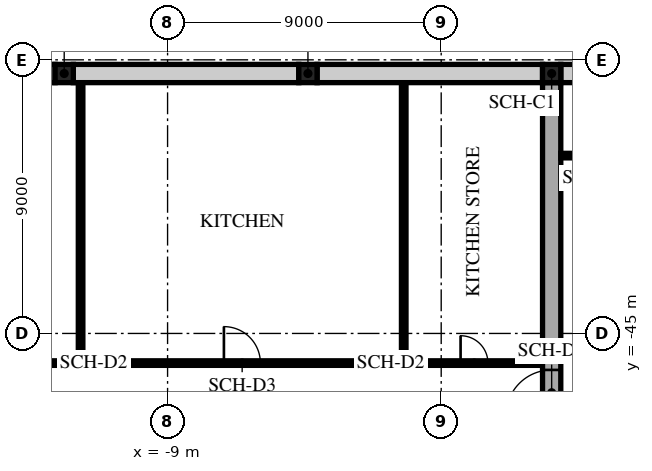
"""IFC4 building model, lengths in metres.
Left out: names, types, materials, properties, quantities, classifications, styles, units other than length and angle.
Written with IfcOpenShell. Run it as: python <this file> out.ifc"""

import sys

from ifc_helpers import new_model, si_unit, direction, frame, frame_2d, origin, origin_2d, place, context, subcontext, project, spatial, rectangle, extrude, element, fill, save


model = new_model("IFC4")
c1 = context("Model", 3, precision=1e-05, world=origin(), true_north=direction((0.0, 1.0)))
c2 = subcontext(c1, "Body", "Model", "MODEL_VIEW")
j1 = project(units=[si_unit("LENGTHUNIT", "METRE"), si_unit("PLANEANGLEUNIT", "RADIAN")], contexts=[c1])
p1 = place(None, origin())
s1 = spatial("IfcSite", under=j1, at=p1, CompositionType="ELEMENT")
p2 = place(p1, origin())
s2 = spatial("IfcBuilding", under=s1, at=p2, CompositionType="ELEMENT")
p3 = place(p2, origin())
s3 = spatial("IfcBuildingStorey", under=s2, at=p3, CompositionType="ELEMENT", Elevation=0.0)
for number, where, z_axis, x_axis in (
    (1, (-12.4, -36.45, -0.2), (0.0, 0.0, 1.0), (1.0, 0.0, 0.0)),
    (2, (-4.383, -36.45, -0.2), (0.0, 0.0, 1.0), (1.0, 0.0, 0.0)),
    (3, (3.633, -36.45, -0.2), (0.0, 0.0, 1.0), (1.0, 0.0, 0.0)),
):
    element("IfcColumn", number, at=place(p3, frame(where, z_axis=z_axis, x_axis=x_axis)), inside=s3, PredefinedType="COLUMN", context=c2, shape_type="SweptSolid", body=[
        extrude(rectangle(XDim=0.6, YDim=0.6, at=origin_2d()), origin(), (0.0, 0.0, 1.0), 4.7),
    ])
for number, where, z_axis, x_axis in (
    (4, (-11.861, -45.9, 0.0), (0.0, 0.0, 1.0), (0.0, 1.0, 0.0)),
    (5, (-1.233, -45.9, 0.0), (0.0, 0.0, 1.0), (0.0, 1.0, 0.0)),
):
    element("IfcWall", number, at=place(p3, frame(where, z_axis=z_axis, x_axis=x_axis)), inside=s3, PredefinedType="PARTITIONING", context=c2, shape_type="SweptSolid", body=[
        extrude(rectangle(XDim=9.15, YDim=0.15, at=frame_2d((4.575, 0.0))), origin(), (0.0, 0.0, 1.0), 4.1),
    ])
p4 = place(p3, frame((-16.502, -45.975, 0.0), z_axis=(0.0, 0.0, 1.0), x_axis=(1.0, 0.0, 0.0)))
e6 = element("IfcWall", 6, at=p4, inside=s3, PredefinedType="PARTITIONING", context=c2, shape_type="SweptSolid", body=[
    extrude(rectangle(XDim=4.641, YDim=0.15, at=frame_2d((2.32, 0.0))), origin(), (0.0, 0.0, 1.0), 4.1),
])
p5 = place(p4, frame((1.87, 0.0, 0.0)))
e7 = element("IfcOpeningElement", 7, at=p5, cuts=e6, PredefinedType="OPENING", context=c2, shape_type="SweptSolid", body=[
    extrude(rectangle(XDim=0.9, YDim=2.1, at=frame_2d((0.45, 1.05))), frame((0.0, 0.085, 0.0), z_axis=(0.0, -1.0, 0.0), x_axis=(1.0, 0.0, 0.0)), (0.0, 0.0, 1.0), 0.17),
])
p6 = place(p3, frame((-11.861, -45.975, 0.0), z_axis=(0.0, 0.0, 1.0), x_axis=(1.0, 0.0, 0.0)))
e8 = element("IfcWall", 8, at=p6, inside=s3, PredefinedType="PARTITIONING", context=c2, shape_type="SweptSolid", body=[
    extrude(rectangle(XDim=10.628, YDim=0.15, at=frame_2d((5.314, 0.0))), origin(), (0.0, 0.0, 1.0), 4.1),
])
p7 = place(p6, frame((4.714, 0.0, 0.0)))
e9 = element("IfcOpeningElement", 9, at=p7, cuts=e8, PredefinedType="OPENING", context=c2, shape_type="SweptSolid", body=[
    extrude(rectangle(XDim=1.2, YDim=2.1, at=frame_2d((0.6, 1.05))), frame((0.0, 0.085, 0.0), z_axis=(0.0, -1.0, 0.0), x_axis=(1.0, 0.0, 0.0)), (0.0, 0.0, 1.0), 0.17),
])
p8 = place(p3, frame((-1.233, -45.975, 0.0), z_axis=(0.0, 0.0, 1.0), x_axis=(1.0, 0.0, 0.0)))
e10 = element("IfcWall", 10, at=p8, inside=s3, PredefinedType="PARTITIONING", context=c2, shape_type="SweptSolid", body=[
    extrude(rectangle(XDim=4.566, YDim=0.15, at=frame_2d((2.283, 0.0))), origin(), (0.0, 0.0, 1.0), 4.1),
])
p9 = place(p8, frame((1.87, 0.0, 0.0)))
e11 = element("IfcOpeningElement", 11, at=p9, cuts=e10, PredefinedType="OPENING", context=c2, shape_type="SweptSolid", body=[
    extrude(rectangle(XDim=0.9, YDim=2.1, at=frame_2d((0.45, 1.05))), frame((0.0, 0.085, 0.0), z_axis=(0.0, -1.0, 0.0), x_axis=(1.0, 0.0, 0.0)), (0.0, 0.0, 1.0), 0.17),
])
for number, where, z_axis, x_axis in (
    (12, (-20.117, -36.45, -0.2), (0.0, 0.0, 1.0), (1.0, 0.0, 0.0)),
    (13, (-12.1, -36.45, -0.2), (0.0, 0.0, 1.0), (1.0, 0.0, 0.0)),
):
    element("IfcWall", number, at=place(p3, frame(where, z_axis=z_axis, x_axis=x_axis)), inside=s3, PredefinedType="STANDARD", context=c2, shape_type="SweptSolid", body=[
        extrude(rectangle(XDim=7.417, YDim=0.6, at=frame_2d((3.708, 0.0))), origin(), (0.0, 0.0, 1.0), 4.3),
    ])
p10 = place(p3, frame((-4.083, -36.45, -0.2), z_axis=(0.0, 0.0, 1.0), x_axis=(1.0, 0.0, 0.0)))
e14 = element("IfcWall", 14, at=p10, inside=s3, PredefinedType="STANDARD", context=c2, shape_type="SweptSolid", body=[
    extrude(rectangle(XDim=7.417, YDim=0.6, at=frame_2d((3.708, 0.0))), origin(), (0.0, 0.0, 1.0), 4.3),
])
p11 = place(p3, frame((3.933, -36.45, -0.2), z_axis=(0.0, 0.0, 1.0), x_axis=(1.0, 0.0, 0.0)))
e15 = element("IfcWall", 15, at=p11, inside=s3, PredefinedType="SOLIDWALL", context=c2, shape_type="SweptSolid", body=[
    extrude(rectangle(XDim=7.417, YDim=0.6, at=frame_2d((3.708, 0.0))), origin(), (0.0, 0.0, 1.0), 4.7),
])
p12 = place(p3, frame((3.633, -47.85, -0.2), z_axis=(0.0, 0.0, 1.0), x_axis=(0.0, 1.0, 0.0)))
e16 = element("IfcWall", 16, at=p12, inside=s3, PredefinedType="SOLIDWALL", context=c2, shape_type="SweptSolid", body=[
    extrude(rectangle(XDim=11.1, YDim=0.6, at=frame_2d((5.55, 0.0))), origin(), (0.0, 0.0, 1.0), 4.7),
])
p13 = place(p12, frame((0.15, 0.0, 0.2)))
e17 = element("IfcOpeningElement", 17, at=p13, cuts=e16, PredefinedType="OPENING", context=c2, shape_type="SweptSolid", body=[
    extrude(rectangle(XDim=1.5, YDim=2.4, at=frame_2d((0.75, 1.2))), frame((0.0, 0.31, 0.0), z_axis=(0.0, -1.0, 0.0), x_axis=(1.0, 0.0, 0.0)), (0.0, 0.0, 1.0), 0.62),
])
p14 = place(p3, frame((3.933, -39.15, 0.0), z_axis=(0.0, 0.0, 1.0), x_axis=(1.0, 0.0, 0.0)))
e18 = element("IfcWall", 18, at=p14, inside=s3, PredefinedType="SHEAR", context=c2, shape_type="SweptSolid", body=[
    extrude(rectangle(XDim=2.55, YDim=0.15, at=frame_2d((1.275, 0.0))), origin(), (0.0, 0.0, 1.0), 4.5),
])
p15 = place(p14, frame((0.717, 0.0, 0.0)))
e19 = element("IfcOpeningElement", 19, at=p15, cuts=e18, PredefinedType="OPENING", context=c2, shape_type="SweptSolid", body=[
    extrude(rectangle(XDim=0.9, YDim=2.1, at=frame_2d((0.45, 1.05))), frame((0.0, 0.085, 0.0), z_axis=(0.0, -1.0, 0.0), x_axis=(1.0, 0.0, 0.0)), (0.0, 0.0, 1.0), 0.17),
])
p16 = place(p3, frame((-30.876, -35.7, 0.0), z_axis=(0.0, 0.0, 1.0), x_axis=(1.0, 0.0, 0.0)))
e20 = element("IfcWall", 20, at=p16, inside=s3, PredefinedType="STANDARD", context=c2, shape_type="SweptSolid", body=[
    extrude(rectangle(XDim=61.751, YDim=0.6, at=frame_2d((30.876, 0.0))), origin(), (0.0, 0.0, 1.0), 4.1),
])
p17 = place(p7, origin())
e21 = element("IfcDoor", 21, at=p17, inside=s3, OperationType="SINGLE_SWING_LEFT", PredefinedType="DOOR", context=c2, shape_type="SweptSolid", body=[
    extrude(rectangle(XDim=1.2, YDim=2.1, at=frame_2d((0.6, 1.05))), frame((0.0, 0.025, 0.0), z_axis=(0.0, -1.0, 0.0), x_axis=(1.0, 0.0, 0.0)), (0.0, 0.0, 1.0), 0.05),
])
fill(e9, e21)
p18 = place(p9, origin())
e22 = element("IfcDoor", 22, at=p18, inside=s3, OperationType="SINGLE_SWING_RIGHT", PredefinedType="DOOR", context=c2, shape_type="SweptSolid", body=[
    extrude(rectangle(XDim=0.9, YDim=2.1, at=frame_2d((0.45, 1.05))), frame((0.0, 0.025, 0.0), z_axis=(0.0, -1.0, 0.0), x_axis=(1.0, 0.0, 0.0)), (0.0, 0.0, 1.0), 0.05),
])
fill(e11, e22)
p19 = place(p13, origin())
e23 = element("IfcDoor", 23, at=p19, inside=s3, OperationType="DOUBLE_DOOR_SINGLE_SWING", PredefinedType="DOOR", context=c2, shape_type="SweptSolid", body=[
    extrude(rectangle(XDim=1.5, YDim=2.4, at=frame_2d((0.75, 1.2))), frame((0.0, 0.025, 0.0), z_axis=(0.0, -1.0, 0.0), x_axis=(1.0, 0.0, 0.0)), (0.0, 0.0, 1.0), 0.05),
])
fill(e17, e23)
save(model, sys.argv[1])
